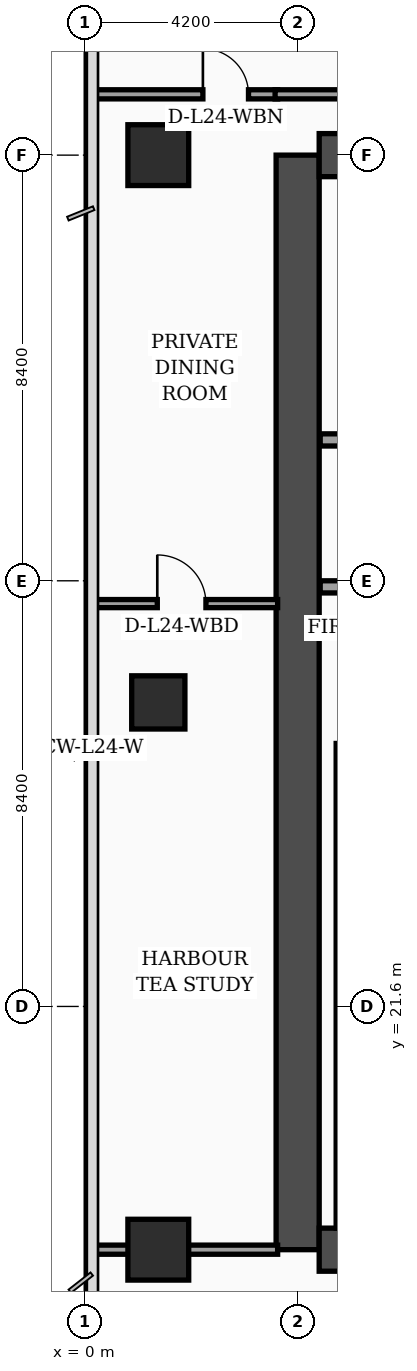
"""IFC4 building model, lengths in metres.
Left out: names, types, materials, properties, quantities, classifications, styles, units other than length and angle.
Written with IfcOpenShell. Run it as: python <this file> out.ifc"""

import sys

from ifc_helpers import new_model, si_unit, direction, frame, frame_2d, origin, origin_2d, place, context, subcontext, project, spatial, rectangle, extrude, element, fill, save


model = new_model("IFC4")
c1 = context("Model", 3, precision=1e-05, world=origin(), true_north=direction((0.0, 1.0)))
c2 = subcontext(c1, "Body", "Model", "MODEL_VIEW")
j1 = project(units=[si_unit("LENGTHUNIT", "METRE"), si_unit("PLANEANGLEUNIT", "RADIAN")], contexts=[c1])
p1 = place(None, origin())
s1 = spatial("IfcSite", under=j1, at=p1, CompositionType="ELEMENT")
p2 = place(p1, origin())
s2 = spatial("IfcBuilding", under=s1, at=p2, CompositionType="ELEMENT")
p3 = place(p2, frame((0.0, 0.0, 101.2)))
s3 = spatial("IfcBuildingStorey", under=s2, at=p3, CompositionType="ELEMENT", Elevation=101.2)
p4 = place(p3, frame((4.2, 16.8, 0.0), z_axis=(0.0, 0.0, 1.0), x_axis=(0.0, 1.0, 0.0)))
e1 = element("IfcWall", 1, at=p4, inside=s3, PredefinedType="SHEAR", context=c2, shape_type="SweptSolid", body=[
    extrude(rectangle(XDim=21.6, YDim=0.85, at=frame_2d((10.8, 0.0))), origin(), (0.0, 0.0, 1.0), 3.56),
])
for number, where, z_axis, x_axis in (
    (2, (4.625, 38.4, 0.0), (0.0, 0.0, 1.0), (1.0, 0.0, 0.0)),
    (3, (4.625, 16.8, 0.0), (0.0, 0.0, 1.0), (1.0, 0.0, 0.0)),
):
    element("IfcWall", number, at=place(p3, frame(where, z_axis=z_axis, x_axis=x_axis)), inside=s3, PredefinedType="SHEAR", context=c2, shape_type="SweptSolid", body=[
        extrude(rectangle(XDim=9.95, YDim=0.85, at=frame_2d((4.975, 0.0))), origin(), (0.0, 0.0, 1.0), 3.56),
    ])
p5 = place(p3, frame((5.08, 17.225, 0.0), z_axis=(0.0, 0.0, 1.0), x_axis=(0.0, 1.0, 0.0)))
e4 = element("IfcWall", 4, at=p5, inside=s3, PredefinedType="SOLIDWALL", context=c2, shape_type="SweptSolid", body=[
    extrude(rectangle(XDim=9.565, YDim=0.24, at=frame_2d((4.782, 0.0))), origin(), (0.0, 0.0, 1.0), 3.56),
])
p6 = place(p3, frame((1.45, 16.8, 0.0), z_axis=(0.0, 0.0, 1.0), x_axis=(1.0, 0.0, 0.0)))
e5 = element("IfcColumn", 5, at=p6, inside=s3, PredefinedType="COLUMN", context=c2, shape_type="SweptSolid", body=[
    extrude(rectangle(XDim=1.2, YDim=1.2, at=origin_2d()), origin(), (0.0, 0.0, 1.0), 3.56),
])
p7 = place(p3, frame((1.45, 27.6, 0.0), z_axis=(0.0, 0.0, 1.0), x_axis=(1.0, 0.0, 0.0)))
e6 = element("IfcColumn", 6, at=p7, inside=s3, PredefinedType="COLUMN", context=c2, shape_type="SweptSolid", body=[
    extrude(rectangle(XDim=1.05, YDim=1.05, at=origin_2d()), origin(), (0.0, 0.0, 1.0), 3.56),
])
p8 = place(p3, frame((1.45, 38.4, 0.0), z_axis=(0.0, 0.0, 1.0), x_axis=(1.0, 0.0, 0.0)))
e7 = element("IfcColumn", 7, at=p8, inside=s3, PredefinedType="COLUMN", context=c2, shape_type="SweptSolid", body=[
    extrude(rectangle(XDim=1.2, YDim=1.2, at=origin_2d()), origin(), (0.0, 0.0, 1.0), 3.56),
])
p9 = place(p3, frame((4.645, 29.88, 0.0), z_axis=(0.0, 0.0, 1.0), x_axis=(1.0, 0.0, 0.0)))
e8 = element("IfcWall", 8, at=p9, inside=s3, PredefinedType="SOLIDWALL", context=c2, shape_type="SweptSolid", body=[
    extrude(rectangle(XDim=4.775, YDim=0.24, at=frame_2d((2.387, 0.0))), origin(), (0.0, 0.0, 1.0), 3.56),
])
p10 = place(p9, frame((0.45, 0.0, 0.0)))
e9 = element("IfcOpeningElement", 9, at=p10, cuts=e8, PredefinedType="OPENING", context=c2, shape_type="SweptSolid", body=[
    extrude(rectangle(XDim=1.3, YDim=2.35, at=frame_2d((0.65, 1.175))), frame((0.0, 0.13, 0.0), z_axis=(0.0, -1.0, 0.0), x_axis=(1.0, 0.0, 0.0)), (0.0, 0.0, 1.0), 0.26),
])
p11 = place(p3, frame((4.645, 32.78, 0.0), z_axis=(0.0, 0.0, 1.0), x_axis=(1.0, 0.0, 0.0)))
e10 = element("IfcWall", 10, at=p11, inside=s3, PredefinedType="SOLIDWALL", context=c2, shape_type="SweptSolid", body=[
    extrude(rectangle(XDim=4.775, YDim=0.24, at=frame_2d((2.387, 0.0))), origin(), (0.0, 0.0, 1.0), 3.19),
])
p12 = place(p3, frame((0.08, 29.55, 0.0), z_axis=(0.0, 0.0, 1.0), x_axis=(1.0, 0.0, 0.0)))
e11 = element("IfcWall", 11, at=p12, inside=s3, PredefinedType="PARTITIONING", context=c2, shape_type="SweptSolid", body=[
    extrude(rectangle(XDim=3.725, YDim=0.16, at=frame_2d((1.862, 0.0))), origin(), (0.0, 0.0, 1.0), 3.04),
])
p13 = place(p12, frame((1.35, 0.0, 0.0)))
e12 = element("IfcOpeningElement", 12, at=p13, cuts=e11, PredefinedType="OPENING", context=c2, shape_type="SweptSolid", body=[
    extrude(rectangle(XDim=0.96, YDim=2.2, at=frame_2d((0.48, 1.1))), frame((0.0, 0.09, 0.0), z_axis=(0.0, -1.0, 0.0), x_axis=(1.0, 0.0, 0.0)), (0.0, 0.0, 1.0), 0.18),
])
p14 = place(p3, frame((0.08, 16.8, 0.0), z_axis=(0.0, 0.0, 1.0), x_axis=(1.0, 0.0, 0.0)))
e13 = element("IfcWall", 13, at=p14, inside=s3, PredefinedType="PARTITIONING", context=c2, shape_type="SweptSolid", body=[
    extrude(rectangle(XDim=3.725, YDim=0.18, at=frame_2d((1.862, 0.0))), origin(), (0.0, 0.0, 1.0), 2.84),
])
p15 = place(p3, frame((0.08, 39.6, 0.0), z_axis=(0.0, 0.0, 1.0), x_axis=(1.0, 0.0, 0.0)))
e14 = element("IfcWall", 14, at=p15, inside=s3, PredefinedType="PARTITIONING", context=c2, shape_type="SweptSolid", body=[
    extrude(rectangle(XDim=3.725, YDim=0.18, at=frame_2d((1.862, 0.0))), origin(), (0.0, 0.0, 1.0), 2.84),
])
p16 = place(p15, frame((2.25, 0.0, 0.0)))
e15 = element("IfcOpeningElement", 15, at=p16, cuts=e14, PredefinedType="OPENING", context=c2, shape_type="SweptSolid", body=[
    extrude(rectangle(XDim=0.9, YDim=2.15, at=frame_2d((0.45, 1.075))), frame((0.0, 0.1, 0.0), z_axis=(0.0, -1.0, 0.0), x_axis=(1.0, 0.0, 0.0)), (0.0, 0.0, 1.0), 0.2),
])
p17 = place(p3, frame((3.755, 39.6, 0.0), z_axis=(0.0, 0.0, 1.0), x_axis=(1.0, 0.0, 0.0)))
e16 = element("IfcWall", 16, at=p17, inside=s3, PredefinedType="PARTITIONING", context=c2, shape_type="SweptSolid", body=[
    extrude(rectangle(XDim=11.395, YDim=0.18, at=frame_2d((5.698, 0.0))), origin(), (0.0, 0.0, 1.0), 2.84),
])
p18 = place(p13, origin())
e17 = element("IfcDoor", 17, at=p18, inside=s3, OperationType="SINGLE_SWING_LEFT", PredefinedType="DOOR", context=c2, shape_type="SweptSolid", body=[
    extrude(rectangle(XDim=0.96, YDim=2.2, at=frame_2d((0.48, 1.1))), frame((0.0, 0.025, 0.0), z_axis=(0.0, -1.0, 0.0), x_axis=(1.0, 0.0, 0.0)), (0.0, 0.0, 1.0), 0.05),
])
fill(e12, e17)
p19 = place(p16, origin())
e18 = element("IfcDoor", 18, at=p19, inside=s3, OperationType="SINGLE_SWING_LEFT", PredefinedType="DOOR", context=c2, shape_type="SweptSolid", body=[
    extrude(rectangle(XDim=0.9, YDim=2.15, at=frame_2d((0.45, 1.075))), frame((0.0, 0.025, 0.0), z_axis=(0.0, -1.0, 0.0), x_axis=(1.0, 0.0, 0.0)), (0.0, 0.0, 1.0), 0.05),
])
fill(e15, e18)
save(model, sys.argv[1])
